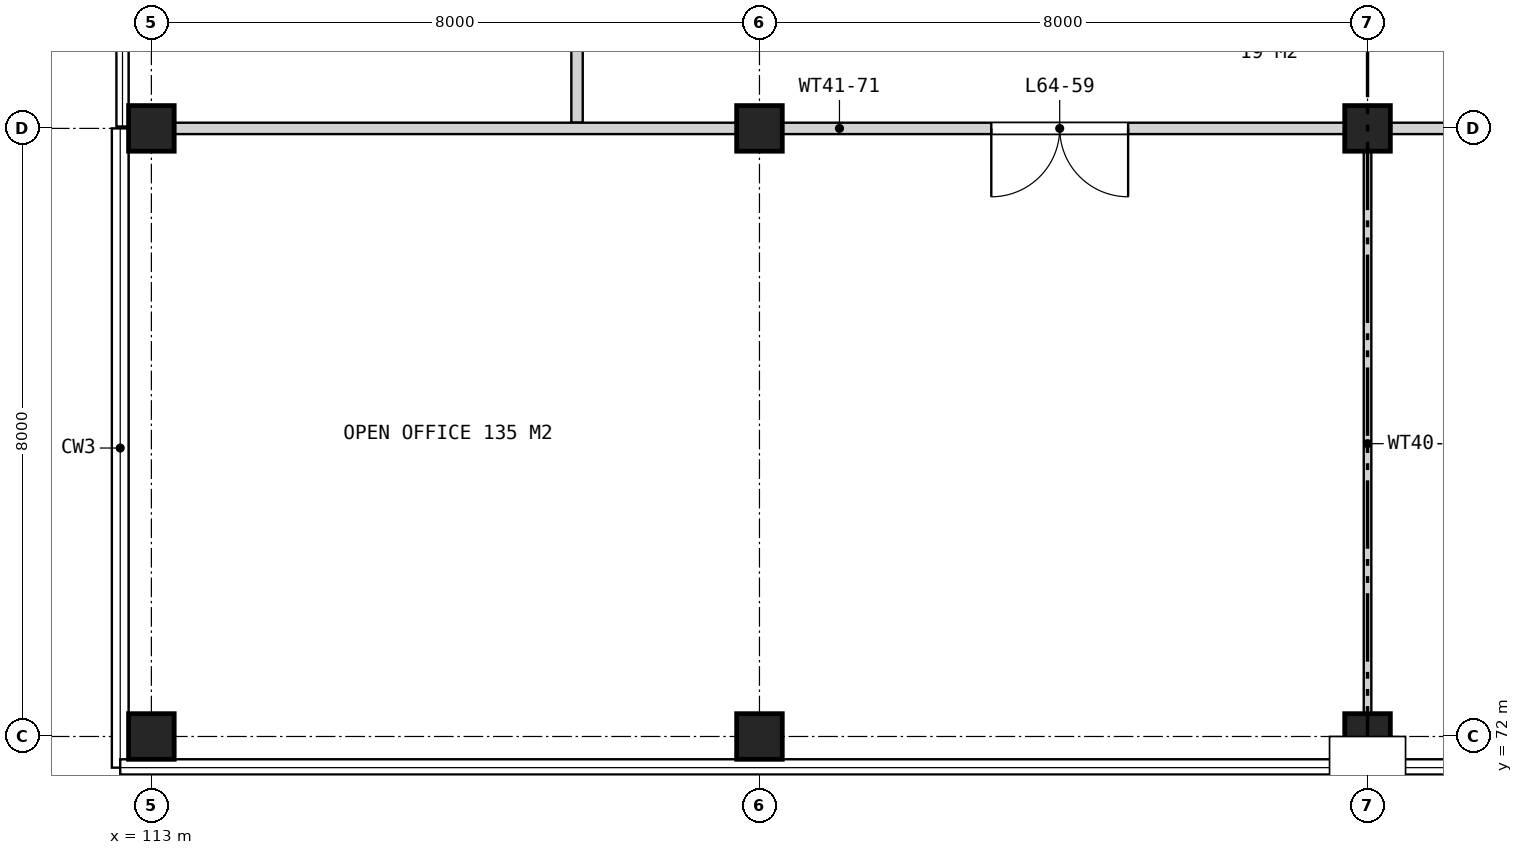
"""IFC4 building model, lengths in metres.
Left out: names, types, materials, properties, quantities, classifications, styles, units other than length and angle.
Written with IfcOpenShell. Run it as: python <this file> out.ifc"""

import sys

from ifc_helpers import new_model, si_unit, direction, frame, frame_2d, origin, origin_2d, place, context, subcontext, project, spatial, rectangle, extrude, element, fill, save


model = new_model("IFC4")
c1 = context("Model", 3, precision=1e-05, world=origin(), true_north=direction((0.0, 1.0)))
c2 = subcontext(c1, "Body", "Model", "MODEL_VIEW")
j1 = project(units=[si_unit("LENGTHUNIT", "METRE"), si_unit("PLANEANGLEUNIT", "RADIAN")], contexts=[c1])
p1 = place(None, origin())
s1 = spatial("IfcSite", under=j1, at=p1, CompositionType="ELEMENT")
p2 = place(p1, origin())
s2 = spatial("IfcBuilding", under=s1, at=p2, CompositionType="ELEMENT")
p3 = place(p2, frame((0.0, 0.0, 295.5)))
s3 = spatial("IfcBuildingStorey", under=s2, at=p3, CompositionType="ELEMENT", Elevation=295.5)
for number, where, z_axis, x_axis in (
    (1, (113.0, 72.0, 0.0), (0.0, 0.0, 1.0), (1.0, 0.0, 0.0)),
    (2, (113.0, 80.0, 0.0), (0.0, 0.0, 1.0), (1.0, 0.0, 0.0)),
    (3, (121.0, 72.0, 0.0), (0.0, 0.0, 1.0), (1.0, 0.0, 0.0)),
    (4, (121.0, 80.0, 0.0), (0.0, 0.0, 1.0), (1.0, 0.0, 0.0)),
    (5, (129.0, 72.0, 0.0), (0.0, 0.0, 1.0), (1.0, 0.0, 0.0)),
    (6, (129.0, 80.0, 0.0), (0.0, 0.0, 1.0), (1.0, 0.0, 0.0)),
):
    element("IfcColumn", number, at=place(p3, frame(where, z_axis=z_axis, x_axis=x_axis)), inside=s3, PredefinedType="COLUMN", context=c2, shape_type="SweptSolid", body=[
        extrude(rectangle(XDim=0.6, YDim=0.6, at=origin_2d()), origin(), (0.0, 0.0, 1.0), 4.2),
    ])
p4 = place(p3, frame((118.6, 80.075, 0.0), z_axis=(0.0, 0.0, 1.0), x_axis=(0.0, 1.0, 0.0)))
e7 = element("IfcWall", 7, at=p4, inside=s3, PredefinedType="PARTITIONING", context=c2, shape_type="SweptSolid", body=[
    extrude(rectangle(XDim=13.925, YDim=0.15, at=frame_2d((6.962, 0.0))), origin(), (0.0, 0.0, 1.0), 3.443),
])
p5 = place(p4, frame((12.175, 0.0, 0.0)))
e8 = element("IfcOpeningElement", 8, at=p5, cuts=e7, PredefinedType="OPENING", context=c2, shape_type="SweptSolid", body=[
    extrude(rectangle(XDim=1.0, YDim=2.1, at=frame_2d((0.5, 1.05))), frame((0.0, 0.085, 0.0), z_axis=(0.0, -1.0, 0.0), x_axis=(1.0, 0.0, 0.0)), (0.0, 0.0, 1.0), 0.17),
])
p6 = place(p4, frame((9.175, 0.0, 0.0)))
e9 = element("IfcOpeningElement", 9, at=p6, cuts=e7, PredefinedType="OPENING", context=c2, shape_type="SweptSolid", body=[
    extrude(rectangle(XDim=1.0, YDim=2.1, at=frame_2d((0.5, 1.05))), frame((0.0, 0.085, 0.0), z_axis=(0.0, -1.0, 0.0), x_axis=(1.0, 0.0, 0.0)), (0.0, 0.0, 1.0), 0.17),
])
p7 = place(p4, frame((3.45, 0.0, 0.0)))
e10 = element("IfcOpeningElement", 10, at=p7, cuts=e7, PredefinedType="OPENING", context=c2, shape_type="SweptSolid", body=[
    extrude(rectangle(XDim=1.0, YDim=2.1, at=frame_2d((0.5, 1.05))), frame((0.0, 0.085, 0.0), z_axis=(0.0, -1.0, 0.0), x_axis=(1.0, 0.0, 0.0)), (0.0, 0.0, 1.0), 0.17),
])
p8 = place(p3, frame((129.0, 71.78, 0.0), z_axis=(0.0, 0.0, 1.0), x_axis=(0.0, 1.0, 0.0)))
e11 = element("IfcWall", 11, at=p8, inside=s3, PredefinedType="PARTITIONING", context=c2, shape_type="SweptSolid", body=[
    extrude(rectangle(XDim=8.145, YDim=0.1, at=frame_2d((4.073, 0.0))), origin(), (0.0, 0.0, 1.0), 3.443),
])
p9 = place(p3, frame((112.78, 80.0, 0.0), z_axis=(0.0, 0.0, 1.0), x_axis=(1.0, 0.0, 0.0)))
e12 = element("IfcWall", 12, at=p9, inside=s3, PredefinedType="PARTITIONING", context=c2, shape_type="SweptSolid", body=[
    extrude(rectangle(XDim=18.545, YDim=0.15, at=frame_2d((9.272, 0.0))), origin(), (0.0, 0.0, 1.0), 3.443),
])
p10 = place(p9, frame((11.27, 0.0, 0.0)))
e13 = element("IfcOpeningElement", 13, at=p10, cuts=e12, PredefinedType="OPENING", context=c2, shape_type="SweptSolid", body=[
    extrude(rectangle(XDim=1.8, YDim=2.1, at=frame_2d((0.9, 1.05))), frame((0.0, 0.085, 0.0), z_axis=(0.0, -1.0, 0.0), x_axis=(1.0, 0.0, 0.0)), (0.0, 0.0, 1.0), 0.17),
])
p11 = place(p10, frame((1.8, 0.0, 0.0), z_axis=(0.0, 0.0, 1.0), x_axis=(-1.0, 0.0, 0.0)))
e14 = element("IfcDoor", 14, at=p11, inside=s3, OperationType="DOUBLE_DOOR_SINGLE_SWING", PredefinedType="DOOR", context=c2, shape_type="SweptSolid", body=[
    extrude(rectangle(XDim=1.8, YDim=2.1, at=frame_2d((0.9, 1.05))), frame((0.0, 0.025, 0.0), z_axis=(0.0, -1.0, 0.0), x_axis=(1.0, 0.0, 0.0)), (0.0, 0.0, 1.0), 0.05),
])
fill(e13, e14)
save(model, sys.argv[1])
